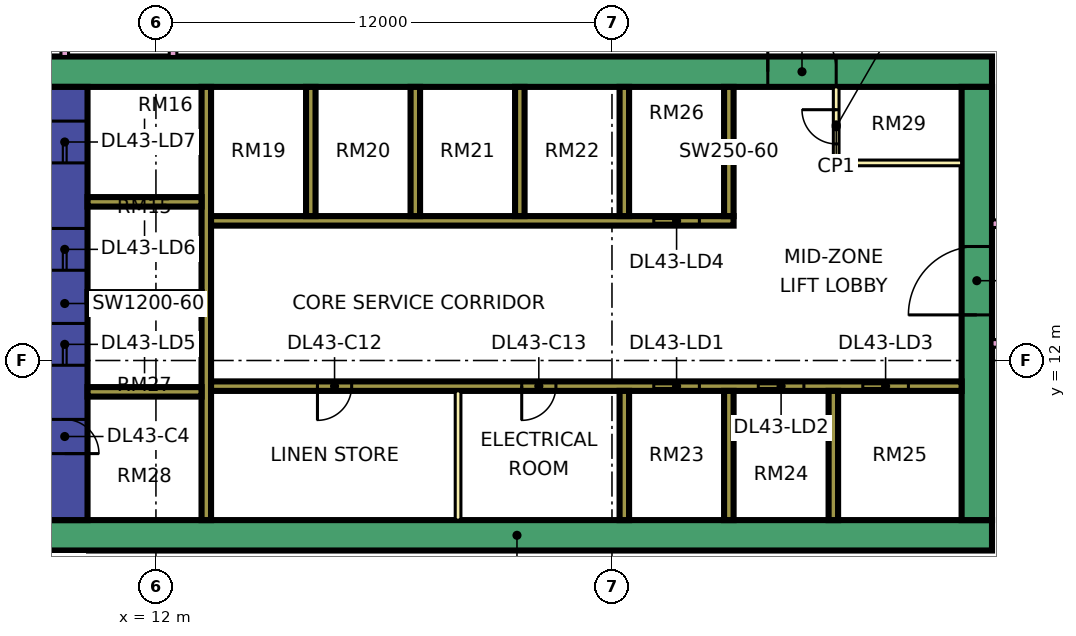
"""IFC4 building model, lengths in metres.
Left out: names, types, materials, properties, quantities, classifications, styles, units other than length and angle.
Written with IfcOpenShell. Run it as: python <this file> out.ifc"""

import sys

from ifc_helpers import new_model, si_unit, direction, frame, frame_2d, origin, place, context, subcontext, project, spatial, rectangle, extrude, element, fill, save


model = new_model("IFC4")
c1 = context("Model", 3, precision=1e-05, world=origin(), true_north=direction((0.0, 1.0)))
c2 = subcontext(c1, "Body", "Model", "MODEL_VIEW")
j1 = project(units=[si_unit("LENGTHUNIT", "METRE"), si_unit("PLANEANGLEUNIT", "RADIAN")], contexts=[c1])
p1 = place(None, origin())
s1 = spatial("IfcSite", under=j1, at=p1, CompositionType="ELEMENT")
p2 = place(p1, origin())
s2 = spatial("IfcBuilding", under=s1, at=p2, CompositionType="ELEMENT")
p3 = place(p2, frame((0.0, 0.0, 187.4)))
s3 = spatial("IfcBuildingStorey", under=s2, at=p3, CompositionType="ELEMENT", Elevation=187.4)
p4 = place(p3, frame((9.0, 7.4, 0.0), z_axis=(0.0, 0.0, 1.0), x_axis=(1.0, 0.0, 0.0)))
e1 = element("IfcWall", 1, at=p4, inside=s3, PredefinedType="SHEAR", context=c2, shape_type="SweptSolid", body=[
    extrude(rectangle(XDim=25.0, YDim=0.8, at=frame_2d((12.5, 0.0))), origin(), (0.0, 0.0, 1.0), 3.75),
])
p5 = place(p3, frame((9.0, 19.6, 0.0), z_axis=(0.0, 0.0, 1.0), x_axis=(1.0, 0.0, 0.0)))
e2 = element("IfcWall", 2, at=p5, inside=s3, PredefinedType="SHEAR", context=c2, shape_type="SweptSolid", body=[
    extrude(rectangle(XDim=25.0, YDim=0.8, at=frame_2d((12.5, 0.0))), origin(), (0.0, 0.0, 1.0), 3.75),
])
p6 = place(p5, frame((19.1, 0.0, 0.0)))
e3 = element("IfcOpeningElement", 3, at=p6, cuts=e2, PredefinedType="OPENING", context=c2, shape_type="SweptSolid", body=[
    extrude(rectangle(XDim=1.8, YDim=2.4, at=frame_2d((0.9, 1.2))), frame((0.0, 0.41, 0.0), z_axis=(0.0, -1.0, 0.0), x_axis=(1.0, 0.0, 0.0)), (0.0, 0.0, 1.0), 0.82),
])
p7 = place(p3, frame((9.6, 7.8, 0.0), z_axis=(0.0, 0.0, 1.0), x_axis=(0.0, 1.0, 0.0)))
e4 = element("IfcWall", 4, at=p7, inside=s3, PredefinedType="SHEAR", context=c2, shape_type="SweptSolid", body=[
    extrude(rectangle(XDim=11.4, YDim=1.2, at=frame_2d((5.7, 0.0))), origin(), (0.0, 0.0, 1.0), 3.75),
])
p8 = place(p7, frame((4.075, 0.0, 0.0)))
e5 = element("IfcOpeningElement", 5, at=p8, cuts=e4, PredefinedType="OPENING", context=c2, shape_type="SweptSolid", body=[
    extrude(rectangle(XDim=1.1, YDim=2.2, at=frame_2d((0.55, 1.1))), frame((0.0, 0.61, 0.0), z_axis=(0.0, -1.0, 0.0), x_axis=(1.0, 0.0, 0.0)), (0.0, 0.0, 1.0), 1.22),
])
p9 = place(p7, frame((6.575, 0.0, 0.0)))
e6 = element("IfcOpeningElement", 6, at=p9, cuts=e4, PredefinedType="OPENING", context=c2, shape_type="SweptSolid", body=[
    extrude(rectangle(XDim=1.1, YDim=2.2, at=frame_2d((0.55, 1.1))), frame((0.0, 0.61, 0.0), z_axis=(0.0, -1.0, 0.0), x_axis=(1.0, 0.0, 0.0)), (0.0, 0.0, 1.0), 1.22),
])
p10 = place(p7, frame((9.4, 0.0, 0.0)))
e7 = element("IfcOpeningElement", 7, at=p10, cuts=e4, PredefinedType="OPENING", context=c2, shape_type="SweptSolid", body=[
    extrude(rectangle(XDim=1.1, YDim=2.2, at=frame_2d((0.55, 1.1))), frame((0.0, 0.61, 0.0), z_axis=(0.0, -1.0, 0.0), x_axis=(1.0, 0.0, 0.0)), (0.0, 0.0, 1.0), 1.22),
])
p11 = place(p7, frame((1.75, 0.0, 0.0)))
e8 = element("IfcOpeningElement", 8, at=p11, cuts=e4, PredefinedType="OPENING", context=c2, shape_type="SweptSolid", body=[
    extrude(rectangle(XDim=0.9, YDim=2.1, at=frame_2d((0.45, 1.05))), frame((0.0, 0.61, 0.0), z_axis=(0.0, -1.0, 0.0), x_axis=(1.0, 0.0, 0.0)), (0.0, 0.0, 1.0), 1.22),
])
p12 = place(p3, frame((33.6, 7.8, 0.0), z_axis=(0.0, 0.0, 1.0), x_axis=(0.0, 1.0, 0.0)))
e9 = element("IfcWall", 9, at=p12, inside=s3, PredefinedType="SHEAR", context=c2, shape_type="SweptSolid", body=[
    extrude(rectangle(XDim=11.4, YDim=0.8, at=frame_2d((5.7, 0.0))), origin(), (0.0, 0.0, 1.0), 3.75),
])
p13 = place(p12, frame((5.4, 0.0, 0.0)))
e10 = element("IfcOpeningElement", 10, at=p13, cuts=e9, PredefinedType="OPENING", context=c2, shape_type="SweptSolid", body=[
    extrude(rectangle(XDim=1.8, YDim=2.4, at=frame_2d((0.9, 1.2))), frame((0.0, 0.41, 0.0), z_axis=(0.0, -1.0, 0.0), x_axis=(1.0, 0.0, 0.0)), (0.0, 0.0, 1.0), 0.82),
])
p14 = place(p3, frame((13.325, 7.8, 0.0), z_axis=(0.0, 0.0, 1.0), x_axis=(0.0, 1.0, 0.0)))
e11 = element("IfcWall", 11, at=p14, inside=s3, PredefinedType="SHEAR", context=c2, shape_type="SweptSolid", body=[
    extrude(rectangle(XDim=11.4, YDim=0.25, at=frame_2d((5.7, 0.0))), origin(), (0.0, 0.0, 1.0), 3.75),
])
p15 = place(p3, frame((13.45, 11.325, 0.0), z_axis=(0.0, 0.0, 1.0), x_axis=(1.0, 0.0, 0.0)))
e12 = element("IfcWall", 12, at=p15, inside=s3, PredefinedType="SHEAR", context=c2, shape_type="SweptSolid", body=[
    extrude(rectangle(XDim=19.75, YDim=0.25, at=frame_2d((9.875, 0.0))), origin(), (0.0, 0.0, 1.0), 3.75),
])
p16 = place(p15, frame((11.65, 0.0, 0.0)))
e13 = element("IfcOpeningElement", 13, at=p16, cuts=e12, PredefinedType="OPENING", context=c2, shape_type="SweptSolid", body=[
    extrude(rectangle(XDim=1.2, YDim=2.2, at=frame_2d((0.6, 1.1))), frame((0.0, 0.135, 0.0), z_axis=(0.0, -1.0, 0.0), x_axis=(1.0, 0.0, 0.0)), (0.0, 0.0, 1.0), 0.27),
])
p17 = place(p15, frame((14.4, 0.0, 0.0)))
e14 = element("IfcOpeningElement", 14, at=p17, cuts=e12, PredefinedType="OPENING", context=c2, shape_type="SweptSolid", body=[
    extrude(rectangle(XDim=1.2, YDim=2.2, at=frame_2d((0.6, 1.1))), frame((0.0, 0.135, 0.0), z_axis=(0.0, -1.0, 0.0), x_axis=(1.0, 0.0, 0.0)), (0.0, 0.0, 1.0), 0.27),
])
p18 = place(p15, frame((17.15, 0.0, 0.0)))
e15 = element("IfcOpeningElement", 15, at=p18, cuts=e12, PredefinedType="OPENING", context=c2, shape_type="SweptSolid", body=[
    extrude(rectangle(XDim=1.2, YDim=2.2, at=frame_2d((0.6, 1.1))), frame((0.0, 0.135, 0.0), z_axis=(0.0, -1.0, 0.0), x_axis=(1.0, 0.0, 0.0)), (0.0, 0.0, 1.0), 0.27),
])
p19 = place(p15, frame((2.8, 0.0, 0.0)))
e16 = element("IfcOpeningElement", 16, at=p19, cuts=e12, PredefinedType="OPENING", context=c2, shape_type="SweptSolid", body=[
    extrude(rectangle(XDim=0.9, YDim=2.1, at=frame_2d((0.45, 1.05))), frame((0.0, 0.135, 0.0), z_axis=(0.0, -1.0, 0.0), x_axis=(1.0, 0.0, 0.0)), (0.0, 0.0, 1.0), 0.27),
])
p20 = place(p15, frame((8.175, 0.0, 0.0)))
e17 = element("IfcOpeningElement", 17, at=p20, cuts=e12, PredefinedType="OPENING", context=c2, shape_type="SweptSolid", body=[
    extrude(rectangle(XDim=0.9, YDim=2.1, at=frame_2d((0.45, 1.05))), frame((0.0, 0.135, 0.0), z_axis=(0.0, -1.0, 0.0), x_axis=(1.0, 0.0, 0.0)), (0.0, 0.0, 1.0), 0.27),
])
p21 = place(p3, frame((13.45, 15.675, 0.0), z_axis=(0.0, 0.0, 1.0), x_axis=(1.0, 0.0, 0.0)))
e18 = element("IfcWall", 18, at=p21, inside=s3, PredefinedType="SHEAR", context=c2, shape_type="SweptSolid", body=[
    extrude(rectangle(XDim=13.75, YDim=0.25, at=frame_2d((6.875, 0.0))), origin(), (0.0, 0.0, 1.0), 3.75),
])
p22 = place(p21, frame((11.65, 0.0, 0.0)))
e19 = element("IfcOpeningElement", 19, at=p22, cuts=e18, PredefinedType="OPENING", context=c2, shape_type="SweptSolid", body=[
    extrude(rectangle(XDim=1.2, YDim=2.2, at=frame_2d((0.6, 1.1))), frame((0.0, 0.135, 0.0), z_axis=(0.0, -1.0, 0.0), x_axis=(1.0, 0.0, 0.0)), (0.0, 0.0, 1.0), 0.27),
])
for number, where, z_axis, x_axis in (
    (20, (10.2, 11.175, 0.0), (0.0, 0.0, 1.0), (1.0, 0.0, 0.0)),
    (21, (10.2, 13.675, 0.0), (0.0, 0.0, 1.0), (1.0, 0.0, 0.0)),
    (22, (10.2, 16.175, 0.0), (0.0, 0.0, 1.0), (1.0, 0.0, 0.0)),
):
    element("IfcWall", number, at=place(p3, frame(where, z_axis=z_axis, x_axis=x_axis)), inside=s3, PredefinedType="SHEAR", context=c2, shape_type="SweptSolid", body=[
        extrude(rectangle(XDim=3.0, YDim=0.25, at=frame_2d((1.5, 0.0))), origin(), (0.0, 0.0, 1.0), 3.75),
    ])
for number, where, z_axis, x_axis in (
    (23, (24.325, 7.8, 0.0), (0.0, 0.0, 1.0), (0.0, 1.0, 0.0)),
    (24, (27.075, 7.8, 0.0), (0.0, 0.0, 1.0), (0.0, 1.0, 0.0)),
    (25, (29.825, 7.8, 0.0), (0.0, 0.0, 1.0), (0.0, 1.0, 0.0)),
    (26, (16.075, 15.8, 0.0), (0.0, 0.0, 1.0), (0.0, 1.0, 0.0)),
    (27, (18.825, 15.8, 0.0), (0.0, 0.0, 1.0), (0.0, 1.0, 0.0)),
    (28, (21.575, 15.8, 0.0), (0.0, 0.0, 1.0), (0.0, 1.0, 0.0)),
    (29, (24.325, 15.8, 0.0), (0.0, 0.0, 1.0), (0.0, 1.0, 0.0)),
    (30, (27.075, 15.8, 0.0), (0.0, 0.0, 1.0), (0.0, 1.0, 0.0)),
):
    element("IfcWall", number, at=place(p3, frame(where, z_axis=z_axis, x_axis=x_axis)), inside=s3, PredefinedType="SHEAR", context=c2, shape_type="SweptSolid", body=[
        extrude(rectangle(XDim=3.4, YDim=0.25, at=frame_2d((1.7, 0.0))), origin(), (0.0, 0.0, 1.0), 3.75),
    ])
p23 = place(p3, frame((-1.447, 12.553, 0.0), z_axis=(0.0, 0.0, 1.0), x_axis=(0.707106781187, -0.707106781187, 0.0)))
e31 = element("IfcWall", 31, at=p23, inside=s3, PredefinedType="SOLIDWALL", context=c2, shape_type="SweptSolid", body=[
    extrude(rectangle(XDim=19.799, YDim=0.15, at=frame_2d((9.899, 0.0))), origin(), (0.0, 0.0, 1.0), 3.35),
])
p24 = place(p23, frame((2.212, 0.0, 0.45)))
e32 = element("IfcOpeningElement", 32, at=p24, cuts=e31, PredefinedType="OPENING", context=c2, shape_type="SweptSolid", body=[
    extrude(rectangle(XDim=3.0, YDim=2.4, at=frame_2d((1.5, 1.2))), frame((0.0, 0.085, 0.0), z_axis=(0.0, -1.0, 0.0), x_axis=(1.0, 0.0, 0.0)), (0.0, 0.0, 1.0), 0.17),
])
p25 = place(p23, frame((10.216, 0.0, 0.45)))
e33 = element("IfcOpeningElement", 33, at=p25, cuts=e31, PredefinedType="OPENING", context=c2, shape_type="SweptSolid", body=[
    extrude(rectangle(XDim=3.0, YDim=2.4, at=frame_2d((1.5, 1.2))), frame((0.0, 0.085, 0.0), z_axis=(0.0, -1.0, 0.0), x_axis=(1.0, 0.0, 0.0)), (0.0, 0.0, 1.0), 0.17),
])
p26 = place(p3, frame((19.95, 7.8, 0.0), z_axis=(0.0, 0.0, 1.0), x_axis=(0.0, 1.0, 0.0)))
e34 = element("IfcWall", 34, at=p26, inside=s3, PredefinedType="PARTITIONING", context=c2, shape_type="SweptSolid", body=[
    extrude(rectangle(XDim=3.4, YDim=0.15, at=frame_2d((1.7, 0.0))), origin(), (0.0, 0.0, 1.0), 3.35),
])
p27 = place(p3, frame((29.9, 17.2, 0.0), z_axis=(0.0, 0.0, 1.0), x_axis=(0.0, 1.0, 0.0)))
e35 = element("IfcWall", 35, at=p27, inside=s3, PredefinedType="PARTITIONING", context=c2, shape_type="SweptSolid", body=[
    extrude(rectangle(XDim=2.0, YDim=0.15, at=frame_2d((1.0, 0.0))), origin(), (0.0, 0.0, 1.0), 3.35),
])
p28 = place(p27, frame((0.5, 0.0, 0.0)))
e36 = element("IfcOpeningElement", 36, at=p28, cuts=e35, PredefinedType="OPENING", context=c2, shape_type="SweptSolid", body=[
    extrude(rectangle(XDim=0.9, YDim=2.1, at=frame_2d((0.45, 1.05))), frame((0.0, 0.085, 0.0), z_axis=(0.0, -1.0, 0.0), x_axis=(1.0, 0.0, 0.0)), (0.0, 0.0, 1.0), 0.17),
])
p29 = place(p3, frame((29.9, 17.2, 0.0), z_axis=(0.0, 0.0, 1.0), x_axis=(1.0, 0.0, 0.0)))
e37 = element("IfcWall", 37, at=p29, inside=s3, PredefinedType="PARTITIONING", context=c2, shape_type="SweptSolid", body=[
    extrude(rectangle(XDim=3.3, YDim=0.15, at=frame_2d((1.65, 0.0))), origin(), (0.0, 0.0, 1.0), 3.35),
])
p30 = place(p3, frame((9.6, 20.0, 0.0), z_axis=(0.0, 0.0, 1.0), x_axis=(0.0, 1.0, 0.0)))
e38 = element("IfcWall", 38, at=p30, inside=s3, PredefinedType="PARTITIONING", context=c2, shape_type="SweptSolid", body=[
    extrude(rectangle(XDim=42.926, YDim=0.2, at=frame_2d((21.463, 0.0))), origin(), (0.0, 0.0, 1.0), 3.35),
])
p31 = place(p30, frame((31.65, 0.0, 0.0)))
e39 = element("IfcOpeningElement", 39, at=p31, cuts=e38, PredefinedType="OPENING", context=c2, shape_type="SweptSolid", body=[
    extrude(rectangle(XDim=1.0, YDim=2.1, at=frame_2d((0.5, 1.05))), frame((0.0, 0.11, 0.0), z_axis=(0.0, -1.0, 0.0), x_axis=(1.0, 0.0, 0.0)), (0.0, 0.0, 1.0), 0.22),
])
p32 = place(p30, frame((0.6, 0.0, 0.0)))
e40 = element("IfcOpeningElement", 40, at=p32, cuts=e38, PredefinedType="OPENING", context=c2, shape_type="SweptSolid", body=[
    extrude(rectangle(XDim=1.2, YDim=2.1, at=frame_2d((0.6, 1.05))), frame((0.0, 0.11, 0.0), z_axis=(0.0, -1.0, 0.0), x_axis=(1.0, 0.0, 0.0)), (0.0, 0.0, 1.0), 0.22),
])
p33 = place(p30, frame((13.65, 0.0, 0.0)))
e41 = element("IfcOpeningElement", 41, at=p33, cuts=e38, PredefinedType="OPENING", context=c2, shape_type="SweptSolid", body=[
    extrude(rectangle(XDim=1.0, YDim=2.1, at=frame_2d((0.5, 1.05))), frame((0.0, 0.11, 0.0), z_axis=(0.0, -1.0, 0.0), x_axis=(1.0, 0.0, 0.0)), (0.0, 0.0, 1.0), 0.22),
])
p34 = place(p3, frame((12.45, 20.0, 0.0), z_axis=(0.0, 0.0, 1.0), x_axis=(0.0, 1.0, 0.0)))
e42 = element("IfcWall", 42, at=p34, inside=s3, PredefinedType="PARTITIONING", context=c2, shape_type="SweptSolid", body=[
    extrude(rectangle(XDim=43.0, YDim=0.2, at=frame_2d((21.5, 0.0))), origin(), (0.0, 0.0, 1.0), 3.35),
])
p35 = place(p34, frame((6.7, 0.0, 0.0)))
e43 = element("IfcOpeningElement", 43, at=p35, cuts=e42, PredefinedType="OPENING", context=c2, shape_type="SweptSolid", body=[
    extrude(rectangle(XDim=1.6, YDim=2.1, at=frame_2d((0.8, 1.05))), frame((0.0, 0.11, 0.0), z_axis=(0.0, -1.0, 0.0), x_axis=(1.0, 0.0, 0.0)), (0.0, 0.0, 1.0), 0.22),
])
p36 = place(p34, frame((12.95, 0.0, 0.0)))
e44 = element("IfcOpeningElement", 44, at=p36, cuts=e42, PredefinedType="OPENING", context=c2, shape_type="SweptSolid", body=[
    extrude(rectangle(XDim=1.0, YDim=2.1, at=frame_2d((0.5, 1.05))), frame((0.0, 0.11, 0.0), z_axis=(0.0, -1.0, 0.0), x_axis=(1.0, 0.0, 0.0)), (0.0, 0.0, 1.0), 0.22),
])
p37 = place(p34, frame((16.9, 0.0, 0.0)))
e45 = element("IfcOpeningElement", 45, at=p37, cuts=e42, PredefinedType="OPENING", context=c2, shape_type="SweptSolid", body=[
    extrude(rectangle(XDim=1.0, YDim=2.1, at=frame_2d((0.5, 1.05))), frame((0.0, 0.11, 0.0), z_axis=(0.0, -1.0, 0.0), x_axis=(1.0, 0.0, 0.0)), (0.0, 0.0, 1.0), 0.22),
])
p38 = place(p34, frame((40.75, 0.0, 0.0)))
e46 = element("IfcOpeningElement", 46, at=p38, cuts=e42, PredefinedType="OPENING", context=c2, shape_type="SweptSolid", body=[
    extrude(rectangle(XDim=1.0, YDim=2.1, at=frame_2d((0.5, 1.05))), frame((0.0, 0.11, 0.0), z_axis=(0.0, -1.0, 0.0), x_axis=(1.0, 0.0, 0.0)), (0.0, 0.0, 1.0), 0.22),
])
p39 = place(p34, frame((1.15, 0.0, 0.0)))
e47 = element("IfcOpeningElement", 47, at=p39, cuts=e42, PredefinedType="OPENING", context=c2, shape_type="SweptSolid", body=[
    extrude(rectangle(XDim=1.8, YDim=2.1, at=frame_2d((0.9, 1.05))), frame((0.0, 0.11, 0.0), z_axis=(0.0, -1.0, 0.0), x_axis=(1.0, 0.0, 0.0)), (0.0, 0.0, 1.0), 0.22),
])
p40 = place(p34, frame((28.6, 0.0, 0.0)))
e48 = element("IfcOpeningElement", 48, at=p40, cuts=e42, PredefinedType="OPENING", context=c2, shape_type="SweptSolid", body=[
    extrude(rectangle(XDim=1.8, YDim=2.1, at=frame_2d((0.9, 1.05))), frame((0.0, 0.11, 0.0), z_axis=(0.0, -1.0, 0.0), x_axis=(1.0, 0.0, 0.0)), (0.0, 0.0, 1.0), 0.22),
])
p41 = place(p3, frame((34.0, 12.45, 0.0), z_axis=(0.0, 0.0, 1.0), x_axis=(1.0, 0.0, 0.0)))
e49 = element("IfcWall", 49, at=p41, inside=s3, PredefinedType="PARTITIONING", context=c2, shape_type="SweptSolid", body=[
    extrude(rectangle(XDim=2.451, YDim=0.2, at=frame_2d((1.226, 0.0))), origin(), (0.0, 0.0, 1.0), 3.35),
])
p42 = place(p3, frame((34.0, 15.6, 0.0), z_axis=(0.0, 0.0, 1.0), x_axis=(1.0, 0.0, 0.0)))
e50 = element("IfcWall", 50, at=p42, inside=s3, PredefinedType="PARTITIONING", context=c2, shape_type="SweptSolid", body=[
    extrude(rectangle(XDim=10.35, YDim=0.2, at=frame_2d((5.175, 0.0))), origin(), (0.0, 0.0, 1.0), 3.35),
])
p43 = place(p42, frame((5.6, 0.0, 0.0)))
e51 = element("IfcOpeningElement", 51, at=p43, cuts=e50, PredefinedType="OPENING", context=c2, shape_type="SweptSolid", body=[
    extrude(rectangle(XDim=1.0, YDim=2.1, at=frame_2d((0.5, 1.05))), frame((0.0, 0.11, 0.0), z_axis=(0.0, -1.0, 0.0), x_axis=(1.0, 0.0, 0.0)), (0.0, 0.0, 1.0), 0.22),
])
p44 = place(p42, frame((0.45, 0.0, 0.0)))
e52 = element("IfcOpeningElement", 52, at=p44, cuts=e50, PredefinedType="OPENING", context=c2, shape_type="SweptSolid", body=[
    extrude(rectangle(XDim=1.2, YDim=2.1, at=frame_2d((0.6, 1.05))), frame((0.0, 0.11, 0.0), z_axis=(0.0, -1.0, 0.0), x_axis=(1.0, 0.0, 0.0)), (0.0, 0.0, 1.0), 0.22),
])
p45 = place(p16, origin())
e53 = element("IfcDoor", 53, at=p45, inside=s3, OperationType="DOUBLE_DOOR_SLIDING", PredefinedType="DOOR", context=c2, shape_type="SweptSolid", body=[
    extrude(rectangle(XDim=1.2, YDim=2.2, at=frame_2d((0.6, 1.1))), frame((0.0, 0.025, 0.0), z_axis=(0.0, -1.0, 0.0), x_axis=(1.0, 0.0, 0.0)), (0.0, 0.0, 1.0), 0.05),
])
fill(e13, e53)
p46 = place(p17, origin())
e54 = element("IfcDoor", 54, at=p46, inside=s3, OperationType="DOUBLE_DOOR_SLIDING", PredefinedType="DOOR", context=c2, shape_type="SweptSolid", body=[
    extrude(rectangle(XDim=1.2, YDim=2.2, at=frame_2d((0.6, 1.1))), frame((0.0, 0.025, 0.0), z_axis=(0.0, -1.0, 0.0), x_axis=(1.0, 0.0, 0.0)), (0.0, 0.0, 1.0), 0.05),
])
fill(e14, e54)
p47 = place(p18, origin())
e55 = element("IfcDoor", 55, at=p47, inside=s3, OperationType="DOUBLE_DOOR_SLIDING", PredefinedType="DOOR", context=c2, shape_type="SweptSolid", body=[
    extrude(rectangle(XDim=1.2, YDim=2.2, at=frame_2d((0.6, 1.1))), frame((0.0, 0.025, 0.0), z_axis=(0.0, -1.0, 0.0), x_axis=(1.0, 0.0, 0.0)), (0.0, 0.0, 1.0), 0.05),
])
fill(e15, e55)
p48 = place(p22, origin())
e56 = element("IfcDoor", 56, at=p48, inside=s3, OperationType="DOUBLE_DOOR_SLIDING", PredefinedType="DOOR", context=c2, shape_type="SweptSolid", body=[
    extrude(rectangle(XDim=1.2, YDim=2.2, at=frame_2d((0.6, 1.1))), frame((0.0, 0.025, 0.0), z_axis=(0.0, -1.0, 0.0), x_axis=(1.0, 0.0, 0.0)), (0.0, 0.0, 1.0), 0.05),
])
fill(e19, e56)
p49 = place(p8, origin())
e57 = element("IfcDoor", 57, at=p49, inside=s3, OperationType="DOUBLE_DOOR_SLIDING", PredefinedType="DOOR", context=c2, shape_type="SweptSolid", body=[
    extrude(rectangle(XDim=1.1, YDim=2.2, at=frame_2d((0.55, 1.1))), frame((0.0, 0.025, 0.0), z_axis=(0.0, -1.0, 0.0), x_axis=(1.0, 0.0, 0.0)), (0.0, 0.0, 1.0), 0.05),
])
fill(e5, e57)
p50 = place(p9, origin())
e58 = element("IfcDoor", 58, at=p50, inside=s3, OperationType="DOUBLE_DOOR_SLIDING", PredefinedType="DOOR", context=c2, shape_type="SweptSolid", body=[
    extrude(rectangle(XDim=1.1, YDim=2.2, at=frame_2d((0.55, 1.1))), frame((0.0, 0.025, 0.0), z_axis=(0.0, -1.0, 0.0), x_axis=(1.0, 0.0, 0.0)), (0.0, 0.0, 1.0), 0.05),
])
fill(e6, e58)
p51 = place(p10, origin())
e59 = element("IfcDoor", 59, at=p51, inside=s3, OperationType="DOUBLE_DOOR_SLIDING", PredefinedType="DOOR", context=c2, shape_type="SweptSolid", body=[
    extrude(rectangle(XDim=1.1, YDim=2.2, at=frame_2d((0.55, 1.1))), frame((0.0, 0.025, 0.0), z_axis=(0.0, -1.0, 0.0), x_axis=(1.0, 0.0, 0.0)), (0.0, 0.0, 1.0), 0.05),
])
fill(e7, e59)
p52 = place(p13, origin())
e60 = element("IfcDoor", 60, at=p52, inside=s3, OperationType="DOUBLE_DOOR_SINGLE_SWING", PredefinedType="DOOR", context=c2, shape_type="SweptSolid", body=[
    extrude(rectangle(XDim=1.8, YDim=2.4, at=frame_2d((0.9, 1.2))), frame((0.0, 0.025, 0.0), z_axis=(0.0, -1.0, 0.0), x_axis=(1.0, 0.0, 0.0)), (0.0, 0.0, 1.0), 0.05),
])
fill(e10, e60)
p53 = place(p6, origin())
e61 = element("IfcDoor", 61, at=p53, inside=s3, OperationType="DOUBLE_DOOR_SINGLE_SWING", PredefinedType="DOOR", context=c2, shape_type="SweptSolid", body=[
    extrude(rectangle(XDim=1.8, YDim=2.4, at=frame_2d((0.9, 1.2))), frame((0.0, 0.025, 0.0), z_axis=(0.0, -1.0, 0.0), x_axis=(1.0, 0.0, 0.0)), (0.0, 0.0, 1.0), 0.05),
])
fill(e3, e61)
p54 = place(p11, frame((0.9, 0.0, 0.0), z_axis=(0.0, 0.0, 1.0), x_axis=(-1.0, 0.0, 0.0)))
e62 = element("IfcDoor", 62, at=p54, inside=s3, OperationType="SINGLE_SWING_LEFT", PredefinedType="DOOR", context=c2, shape_type="SweptSolid", body=[
    extrude(rectangle(XDim=0.9, YDim=2.1, at=frame_2d((0.45, 1.05))), frame((0.0, 0.025, 0.0), z_axis=(0.0, -1.0, 0.0), x_axis=(1.0, 0.0, 0.0)), (0.0, 0.0, 1.0), 0.05),
])
fill(e8, e62)
p55 = place(p19, frame((0.9, 0.0, 0.0), z_axis=(0.0, 0.0, 1.0), x_axis=(-1.0, 0.0, 0.0)))
e63 = element("IfcDoor", 63, at=p55, inside=s3, OperationType="SINGLE_SWING_LEFT", PredefinedType="DOOR", context=c2, shape_type="SweptSolid", body=[
    extrude(rectangle(XDim=0.9, YDim=2.1, at=frame_2d((0.45, 1.05))), frame((0.0, 0.025, 0.0), z_axis=(0.0, -1.0, 0.0), x_axis=(1.0, 0.0, 0.0)), (0.0, 0.0, 1.0), 0.05),
])
fill(e16, e63)
p56 = place(p20, frame((0.9, 0.0, 0.0), z_axis=(0.0, 0.0, 1.0), x_axis=(-1.0, 0.0, 0.0)))
e64 = element("IfcDoor", 64, at=p56, inside=s3, OperationType="SINGLE_SWING_LEFT", PredefinedType="DOOR", context=c2, shape_type="SweptSolid", body=[
    extrude(rectangle(XDim=0.9, YDim=2.1, at=frame_2d((0.45, 1.05))), frame((0.0, 0.025, 0.0), z_axis=(0.0, -1.0, 0.0), x_axis=(1.0, 0.0, 0.0)), (0.0, 0.0, 1.0), 0.05),
])
fill(e17, e64)
p57 = place(p28, frame((0.9, 0.0, 0.0), z_axis=(0.0, 0.0, 1.0), x_axis=(-1.0, 0.0, 0.0)))
e65 = element("IfcDoor", 65, at=p57, inside=s3, OperationType="SINGLE_SWING_RIGHT", PredefinedType="DOOR", context=c2, shape_type="SweptSolid", body=[
    extrude(rectangle(XDim=0.9, YDim=2.1, at=frame_2d((0.45, 1.05))), frame((0.0, 0.025, 0.0), z_axis=(0.0, -1.0, 0.0), x_axis=(1.0, 0.0, 0.0)), (0.0, 0.0, 1.0), 0.05),
])
fill(e36, e65)
save(model, sys.argv[1])
